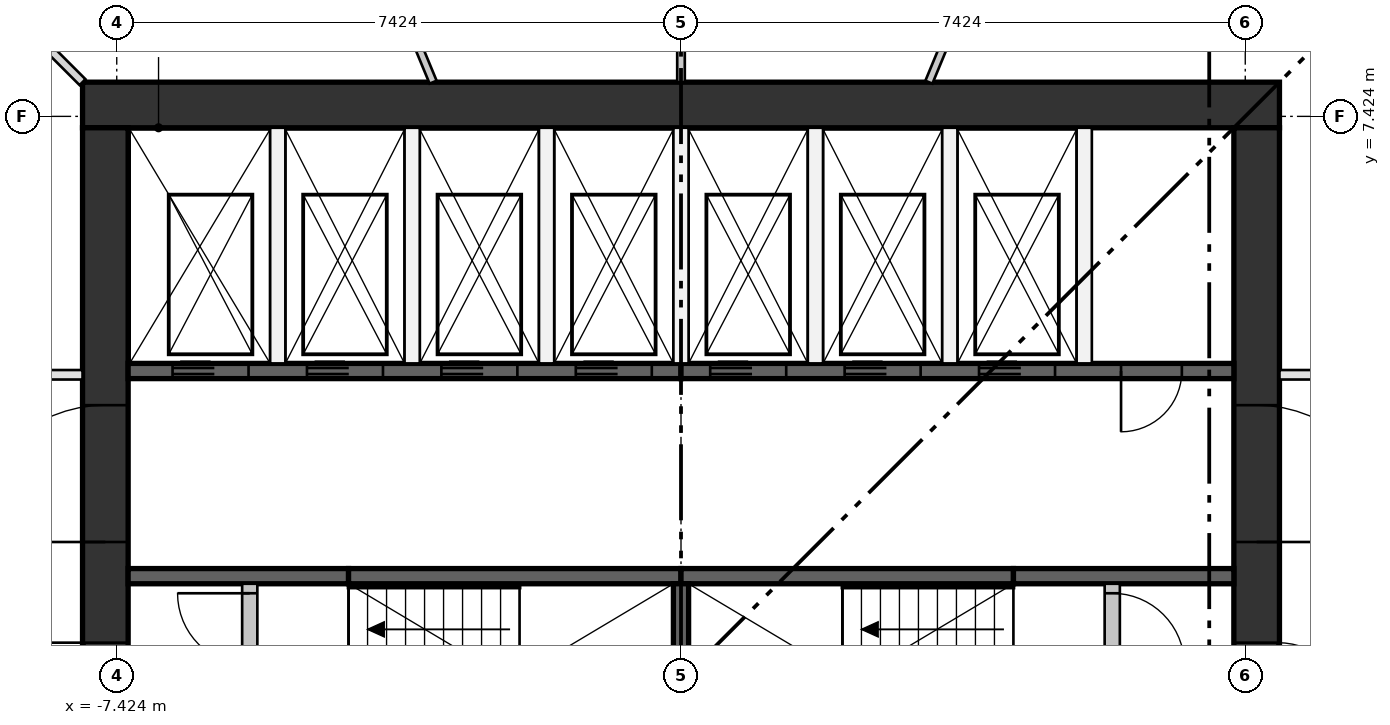
"""IFC4 building model, lengths in metres.
Left out: names, types, materials, properties, quantities, classifications, styles, units other than length and angle.
Written with IfcOpenShell. Run it as: python <this file> out.ifc"""

import sys

from ifc_helpers import new_model, si_unit, direction, frame, frame_2d, origin, place, context, subcontext, project, spatial, rectangle, extrude, element, fill, save


model = new_model("IFC4")
c1 = context("Model", 3, precision=1e-05, world=origin(), true_north=direction((0.0, 1.0)))
c2 = subcontext(c1, "Body", "Model", "MODEL_VIEW")
j1 = project(units=[si_unit("LENGTHUNIT", "METRE"), si_unit("PLANEANGLEUNIT", "RADIAN")], contexts=[c1])
p1 = place(None, origin())
s1 = spatial("IfcSite", under=j1, at=p1, CompositionType="ELEMENT")
p2 = place(p1, origin())
s2 = spatial("IfcBuilding", under=s1, at=p2, CompositionType="ELEMENT")
p3 = place(p2, frame((0.0, 0.0, 124.3)))
s3 = spatial("IfcBuildingStorey", under=s2, at=p3, CompositionType="ELEMENT", Elevation=124.3)
p4 = place(p3, frame((-7.874, 7.574, 0.0), z_axis=(0.0, 0.0, 1.0), x_axis=(1.0, 0.0, 0.0)))
e1 = element("IfcWall", 1, at=p4, inside=s3, PredefinedType="SHEAR", context=c2, shape_type="SweptSolid", body=[
    extrude(rectangle(XDim=15.748, YDim=0.6, at=frame_2d((7.874, 0.0))), origin(), (0.0, 0.0, 1.0), 3.35),
])
p5 = place(p3, frame((-7.574, -7.274, 0.0), z_axis=(0.0, 0.0, 1.0), x_axis=(0.0, 1.0, 0.0)))
e2 = element("IfcWall", 2, at=p5, inside=s3, PredefinedType="SHEAR", context=c2, shape_type="SweptSolid", body=[
    extrude(rectangle(XDim=14.548, YDim=0.6, at=frame_2d((7.274, 0.0))), origin(), (0.0, 0.0, 1.0), 3.35),
])
p6 = place(p5, frame((6.774, 0.0, 0.0)))
e3 = element("IfcOpeningElement", 3, at=p6, cuts=e2, PredefinedType="OPENING", context=c2, shape_type="SweptSolid", body=[
    extrude(rectangle(XDim=1.0, YDim=2.1, at=frame_2d((0.5, 1.05))), frame((0.0, 0.31, 0.0), z_axis=(0.0, -1.0, 0.0), x_axis=(1.0, 0.0, 0.0)), (0.0, 0.0, 1.0), 0.62),
])
p7 = place(p5, frame((3.649, 0.0, 0.0)))
e4 = element("IfcOpeningElement", 4, at=p7, cuts=e2, PredefinedType="OPENING", context=c2, shape_type="SweptSolid", body=[
    extrude(rectangle(XDim=1.8, YDim=2.1, at=frame_2d((0.9, 1.05))), frame((0.0, 0.31, 0.0), z_axis=(0.0, -1.0, 0.0), x_axis=(1.0, 0.0, 0.0)), (0.0, 0.0, 1.0), 0.62),
])
p8 = place(p5, frame((9.098, 0.0, 0.0)))
e5 = element("IfcOpeningElement", 5, at=p8, cuts=e2, PredefinedType="OPENING", context=c2, shape_type="SweptSolid", body=[
    extrude(rectangle(XDim=1.8, YDim=2.1, at=frame_2d((0.9, 1.05))), frame((0.0, 0.31, 0.0), z_axis=(0.0, -1.0, 0.0), x_axis=(1.0, 0.0, 0.0)), (0.0, 0.0, 1.0), 0.62),
])
p9 = place(p3, frame((7.574, -7.274, 0.0), z_axis=(0.0, 0.0, 1.0), x_axis=(0.0, 1.0, 0.0)))
e6 = element("IfcWall", 6, at=p9, inside=s3, PredefinedType="SHEAR", context=c2, shape_type="SweptSolid", body=[
    extrude(rectangle(XDim=14.548, YDim=0.6, at=frame_2d((7.274, 0.0))), origin(), (0.0, 0.0, 1.0), 3.35),
])
p10 = place(p9, frame((6.774, 0.0, 0.0)))
e7 = element("IfcOpeningElement", 7, at=p10, cuts=e6, PredefinedType="OPENING", context=c2, shape_type="SweptSolid", body=[
    extrude(rectangle(XDim=1.0, YDim=2.1, at=frame_2d((0.5, 1.05))), frame((0.0, 0.31, 0.0), z_axis=(0.0, -1.0, 0.0), x_axis=(1.0, 0.0, 0.0)), (0.0, 0.0, 1.0), 0.62),
])
p11 = place(p9, frame((3.649, 0.0, 0.0)))
e8 = element("IfcOpeningElement", 8, at=p11, cuts=e6, PredefinedType="OPENING", context=c2, shape_type="SweptSolid", body=[
    extrude(rectangle(XDim=1.8, YDim=2.1, at=frame_2d((0.9, 1.05))), frame((0.0, 0.31, 0.0), z_axis=(0.0, -1.0, 0.0), x_axis=(1.0, 0.0, 0.0)), (0.0, 0.0, 1.0), 0.62),
])
p12 = place(p9, frame((9.098, 0.0, 0.0)))
e9 = element("IfcOpeningElement", 9, at=p12, cuts=e6, PredefinedType="OPENING", context=c2, shape_type="SweptSolid", body=[
    extrude(rectangle(XDim=1.8, YDim=2.1, at=frame_2d((0.9, 1.05))), frame((0.0, 0.31, 0.0), z_axis=(0.0, -1.0, 0.0), x_axis=(1.0, 0.0, 0.0)), (0.0, 0.0, 1.0), 0.62),
])
p13 = place(p3, frame((-7.274, 4.074, 0.0), z_axis=(0.0, 0.0, 1.0), x_axis=(1.0, 0.0, 0.0)))
e10 = element("IfcWall", 10, at=p13, inside=s3, PredefinedType="SHEAR", context=c2, shape_type="SweptSolid", body=[
    extrude(rectangle(XDim=7.274, YDim=0.2, at=frame_2d((3.637, 0.0))), origin(), (0.0, 0.0, 1.0), 3.0),
])
p14 = place(p13, frame((0.584, 0.0, 0.0)))
e11 = element("IfcOpeningElement", 11, at=p14, cuts=e10, PredefinedType="OPENING", context=c2, shape_type="SweptSolid", body=[
    extrude(rectangle(XDim=1.0, YDim=2.1, at=frame_2d((0.5, 1.05))), frame((0.0, 0.11, 0.0), z_axis=(0.0, -1.0, 0.0), x_axis=(1.0, 0.0, 0.0)), (0.0, 0.0, 1.0), 0.22),
])
p15 = place(p13, frame((2.353, 0.0, 0.0)))
e12 = element("IfcOpeningElement", 12, at=p15, cuts=e10, PredefinedType="OPENING", context=c2, shape_type="SweptSolid", body=[
    extrude(rectangle(XDim=1.0, YDim=2.1, at=frame_2d((0.5, 1.05))), frame((0.0, 0.11, 0.0), z_axis=(0.0, -1.0, 0.0), x_axis=(1.0, 0.0, 0.0)), (0.0, 0.0, 1.0), 0.22),
])
p16 = place(p13, frame((4.121, 0.0, 0.0)))
e13 = element("IfcOpeningElement", 13, at=p16, cuts=e10, PredefinedType="OPENING", context=c2, shape_type="SweptSolid", body=[
    extrude(rectangle(XDim=1.0, YDim=2.1, at=frame_2d((0.5, 1.05))), frame((0.0, 0.11, 0.0), z_axis=(0.0, -1.0, 0.0), x_axis=(1.0, 0.0, 0.0)), (0.0, 0.0, 1.0), 0.22),
])
p17 = place(p13, frame((5.89, 0.0, 0.0)))
e14 = element("IfcOpeningElement", 14, at=p17, cuts=e10, PredefinedType="OPENING", context=c2, shape_type="SweptSolid", body=[
    extrude(rectangle(XDim=1.0, YDim=2.1, at=frame_2d((0.5, 1.05))), frame((0.0, 0.11, 0.0), z_axis=(0.0, -1.0, 0.0), x_axis=(1.0, 0.0, 0.0)), (0.0, 0.0, 1.0), 0.22),
])
p18 = place(p3, frame((0.0, 4.074, 0.0), z_axis=(0.0, 0.0, 1.0), x_axis=(1.0, 0.0, 0.0)))
e15 = element("IfcWall", 15, at=p18, inside=s3, PredefinedType="SHEAR", context=c2, shape_type="SweptSolid", body=[
    extrude(rectangle(XDim=7.274, YDim=0.2, at=frame_2d((3.637, 0.0))), origin(), (0.0, 0.0, 1.0), 3.0),
])
p19 = place(p18, frame((0.384, 0.0, 0.0)))
e16 = element("IfcOpeningElement", 16, at=p19, cuts=e15, PredefinedType="OPENING", context=c2, shape_type="SweptSolid", body=[
    extrude(rectangle(XDim=1.0, YDim=2.1, at=frame_2d((0.5, 1.05))), frame((0.0, 0.11, 0.0), z_axis=(0.0, -1.0, 0.0), x_axis=(1.0, 0.0, 0.0)), (0.0, 0.0, 1.0), 0.22),
])
p20 = place(p18, frame((2.153, 0.0, 0.0)))
e17 = element("IfcOpeningElement", 17, at=p20, cuts=e15, PredefinedType="OPENING", context=c2, shape_type="SweptSolid", body=[
    extrude(rectangle(XDim=1.0, YDim=2.1, at=frame_2d((0.5, 1.05))), frame((0.0, 0.11, 0.0), z_axis=(0.0, -1.0, 0.0), x_axis=(1.0, 0.0, 0.0)), (0.0, 0.0, 1.0), 0.22),
])
p21 = place(p18, frame((3.921, 0.0, 0.0)))
e18 = element("IfcOpeningElement", 18, at=p21, cuts=e15, PredefinedType="OPENING", context=c2, shape_type="SweptSolid", body=[
    extrude(rectangle(XDim=1.0, YDim=2.1, at=frame_2d((0.5, 1.05))), frame((0.0, 0.11, 0.0), z_axis=(0.0, -1.0, 0.0), x_axis=(1.0, 0.0, 0.0)), (0.0, 0.0, 1.0), 0.22),
])
p22 = place(p18, frame((5.79, 0.0, 0.0)))
e19 = element("IfcOpeningElement", 19, at=p22, cuts=e15, PredefinedType="OPENING", context=c2, shape_type="SweptSolid", body=[
    extrude(rectangle(XDim=0.8, YDim=2.1, at=frame_2d((0.4, 1.05))), frame((0.0, 0.11, 0.0), z_axis=(0.0, -1.0, 0.0), x_axis=(1.0, 0.0, 0.0)), (0.0, 0.0, 1.0), 0.22),
])
p23 = place(p3, frame((-7.274, 1.375, 0.0), z_axis=(0.0, 0.0, 1.0), x_axis=(1.0, 0.0, 0.0)))
e20 = element("IfcWall", 20, at=p23, inside=s3, PredefinedType="SHEAR", context=c2, shape_type="SweptSolid", body=[
    extrude(rectangle(XDim=2.9, YDim=0.2, at=frame_2d((1.45, 0.0))), origin(), (0.0, 0.0, 1.0), 3.0),
])
for number, where, z_axis, x_axis in (
    (21, (-4.374, 1.375, 0.0), (0.0, 0.0, 1.0), (1.0, 0.0, 0.0)),
    (22, (0.0, 1.375, 0.0), (0.0, 0.0, 1.0), (1.0, 0.0, 0.0)),
):
    element("IfcWall", number, at=place(p3, frame(where, z_axis=z_axis, x_axis=x_axis)), inside=s3, PredefinedType="SHEAR", context=c2, shape_type="SweptSolid", body=[
        extrude(rectangle(XDim=4.374, YDim=0.2, at=frame_2d((2.187, 0.0))), origin(), (0.0, 0.0, 1.0), 3.0),
    ])
p24 = place(p3, frame((4.374, 1.375, 0.0), z_axis=(0.0, 0.0, 1.0), x_axis=(1.0, 0.0, 0.0)))
e23 = element("IfcWall", 23, at=p24, inside=s3, PredefinedType="SHEAR", context=c2, shape_type="SweptSolid", body=[
    extrude(rectangle(XDim=2.9, YDim=0.2, at=frame_2d((1.45, 0.0))), origin(), (0.0, 0.0, 1.0), 3.0),
])
p25 = place(p3, frame((0.0, -1.275, 0.0), z_axis=(0.0, 0.0, 1.0), x_axis=(0.0, 1.0, 0.0)))
e24 = element("IfcWall", 24, at=p25, inside=s3, PredefinedType="SHEAR", context=c2, shape_type="SweptSolid", body=[
    extrude(rectangle(XDim=2.55, YDim=0.2, at=frame_2d((1.275, 0.0))), origin(), (0.0, 0.0, 1.0), 3.0),
])
for number, where, z_axis, x_axis in (
    (25, (-5.305, 4.174, 0.0), (0.0, 0.0, 1.0), (0.0, 1.0, 0.0)),
    (26, (-3.537, 4.174, 0.0), (0.0, 0.0, 1.0), (0.0, 1.0, 0.0)),
    (27, (-1.769, 4.174, 0.0), (0.0, 0.0, 1.0), (0.0, 1.0, 0.0)),
    (28, (0.0, 4.174, 0.0), (0.0, 0.0, 1.0), (0.0, 1.0, 0.0)),
    (29, (1.769, 4.174, 0.0), (0.0, 0.0, 1.0), (0.0, 1.0, 0.0)),
    (30, (3.537, 4.174, 0.0), (0.0, 0.0, 1.0), (0.0, 1.0, 0.0)),
    (31, (5.305, 4.174, 0.0), (0.0, 0.0, 1.0), (0.0, 1.0, 0.0)),
):
    element("IfcWall", number, at=place(p3, frame(where, z_axis=z_axis, x_axis=x_axis)), inside=s3, PredefinedType="PARTITIONING", context=c2, shape_type="SweptSolid", body=[
        extrude(rectangle(XDim=3.1, YDim=0.2, at=frame_2d((1.55, 0.0))), origin(), (0.0, 0.0, 1.0), 3.0),
    ])
p26 = place(p3, frame((-5.674, -1.275, 0.0), z_axis=(0.0, 0.0, 1.0), x_axis=(0.0, 1.0, 0.0)))
e32 = element("IfcWall", 32, at=p26, inside=s3, PredefinedType="PARTITIONING", context=c2, shape_type="SweptSolid", body=[
    extrude(rectangle(XDim=2.55, YDim=0.2, at=frame_2d((1.275, 0.0))), origin(), (0.0, 0.0, 1.0), 3.0),
])
p27 = place(p26, frame((0.125, 0.0, 0.0)))
e33 = element("IfcOpeningElement", 33, at=p27, cuts=e32, PredefinedType="OPENING", context=c2, shape_type="SweptSolid", body=[
    extrude(rectangle(XDim=0.95, YDim=2.1, at=frame_2d((0.475, 1.05))), frame((0.0, 0.11, 0.0), z_axis=(0.0, -1.0, 0.0), x_axis=(1.0, 0.0, 0.0)), (0.0, 0.0, 1.0), 0.22),
])
p28 = place(p26, frame((1.475, 0.0, 0.0)))
e34 = element("IfcOpeningElement", 34, at=p28, cuts=e32, PredefinedType="OPENING", context=c2, shape_type="SweptSolid", body=[
    extrude(rectangle(XDim=0.95, YDim=2.1, at=frame_2d((0.475, 1.05))), frame((0.0, 0.11, 0.0), z_axis=(0.0, -1.0, 0.0), x_axis=(1.0, 0.0, 0.0)), (0.0, 0.0, 1.0), 0.22),
])
p29 = place(p3, frame((5.674, -1.275, 0.0), z_axis=(0.0, 0.0, 1.0), x_axis=(0.0, 1.0, 0.0)))
e35 = element("IfcWall", 35, at=p29, inside=s3, PredefinedType="PARTITIONING", context=c2, shape_type="SweptSolid", body=[
    extrude(rectangle(XDim=2.55, YDim=0.2, at=frame_2d((1.275, 0.0))), origin(), (0.0, 0.0, 1.0), 3.0),
])
p30 = place(p29, frame((0.125, 0.0, 0.0)))
e36 = element("IfcOpeningElement", 36, at=p30, cuts=e35, PredefinedType="OPENING", context=c2, shape_type="SweptSolid", body=[
    extrude(rectangle(XDim=0.95, YDim=2.1, at=frame_2d((0.475, 1.05))), frame((0.0, 0.11, 0.0), z_axis=(0.0, -1.0, 0.0), x_axis=(1.0, 0.0, 0.0)), (0.0, 0.0, 1.0), 0.22),
])
p31 = place(p29, frame((1.475, 0.0, 0.0)))
e37 = element("IfcOpeningElement", 37, at=p31, cuts=e35, PredefinedType="OPENING", context=c2, shape_type="SweptSolid", body=[
    extrude(rectangle(XDim=0.95, YDim=2.1, at=frame_2d((0.475, 1.05))), frame((0.0, 0.11, 0.0), z_axis=(0.0, -1.0, 0.0), x_axis=(1.0, 0.0, 0.0)), (0.0, 0.0, 1.0), 0.22),
])
p32 = place(p3, frame((7.874, 4.024, 0.0), z_axis=(0.0, 0.0, 1.0), x_axis=(1.0, 0.0, 0.0)))
e38 = element("IfcWall", 38, at=p32, inside=s3, PredefinedType="PARTITIONING", context=c2, shape_type="SweptSolid", body=[
    extrude(rectangle(XDim=5.384, YDim=0.125, at=frame_2d((2.692, 0.0))), origin(), (0.0, 0.0, 1.0), 3.0),
])
p33 = place(p32, frame((1.8, 0.0, 0.0)))
e39 = element("IfcOpeningElement", 39, at=p33, cuts=e38, PredefinedType="OPENING", context=c2, shape_type="SweptSolid", body=[
    extrude(rectangle(XDim=1.8, YDim=2.1, at=frame_2d((0.9, 1.05))), frame((0.0, 0.073, 0.0), z_axis=(0.0, -1.0, 0.0), x_axis=(1.0, 0.0, 0.0)), (0.0, 0.0, 1.0), 0.145),
])
p34 = place(p3, frame((-13.784, 4.024, 0.0), z_axis=(0.0, 0.0, 1.0), x_axis=(1.0, 0.0, 0.0)))
e40 = element("IfcWall", 40, at=p34, inside=s3, PredefinedType="PARTITIONING", context=c2, shape_type="SweptSolid", body=[
    extrude(rectangle(XDim=5.91, YDim=0.125, at=frame_2d((2.955, 0.0))), origin(), (0.0, 0.0, 1.0), 3.0),
])
p35 = place(p34, frame((2.5, 0.0, 0.0)))
e41 = element("IfcOpeningElement", 41, at=p35, cuts=e40, PredefinedType="OPENING", context=c2, shape_type="SweptSolid", body=[
    extrude(rectangle(XDim=1.0, YDim=2.1, at=frame_2d((0.5, 1.05))), frame((0.0, 0.073, 0.0), z_axis=(0.0, -1.0, 0.0), x_axis=(1.0, 0.0, 0.0)), (0.0, 0.0, 1.0), 0.145),
])
p36 = place(p3, frame((3.261, 7.874, 0.0), z_axis=(0.0, 0.0, 1.0), x_axis=(0.382689326263, 0.923877091157, 0.0)))
e42 = element("IfcWall", 42, at=p36, inside=s3, PredefinedType="PARTITIONING", context=c2, shape_type="SweptSolid", body=[
    extrude(rectangle(XDim=6.537, YDim=0.1, at=frame_2d((3.269, 0.0))), origin(), (0.0, 0.0, 1.0), 3.0),
])
p37 = place(p36, frame((2.8, 0.0, 0.0)))
e43 = element("IfcOpeningElement", 43, at=p37, cuts=e42, PredefinedType="OPENING", context=c2, shape_type="SweptSolid", body=[
    extrude(rectangle(XDim=1.0, YDim=2.1, at=frame_2d((0.5, 1.05))), frame((0.0, 0.06, 0.0), z_axis=(0.0, -1.0, 0.0), x_axis=(1.0, 0.0, 0.0)), (0.0, 0.0, 1.0), 0.12),
])
p38 = place(p3, frame((0.0, 7.874, 0.0), z_axis=(0.0, 0.0, 1.0), x_axis=(0.0, 1.0, 0.0)))
e44 = element("IfcWall", 44, at=p38, inside=s3, PredefinedType="PARTITIONING", context=c2, shape_type="SweptSolid", body=[
    extrude(rectangle(XDim=7.186, YDim=0.1, at=frame_2d((3.593, 0.0))), origin(), (0.0, 0.0, 1.0), 3.0),
])
p39 = place(p38, frame((3.1, 0.0, 0.0)))
e45 = element("IfcOpeningElement", 45, at=p39, cuts=e44, PredefinedType="OPENING", context=c2, shape_type="SweptSolid", body=[
    extrude(rectangle(XDim=1.0, YDim=2.1, at=frame_2d((0.5, 1.05))), frame((0.0, 0.06, 0.0), z_axis=(0.0, -1.0, 0.0), x_axis=(1.0, 0.0, 0.0)), (0.0, 0.0, 1.0), 0.12),
])
p40 = place(p3, frame((-3.261, 7.874, 0.0), z_axis=(0.0, 0.0, 1.0), x_axis=(-0.382689326263, 0.923877091157, 0.0)))
e46 = element("IfcWall", 46, at=p40, inside=s3, PredefinedType="PARTITIONING", context=c2, shape_type="SweptSolid", body=[
    extrude(rectangle(XDim=6.537, YDim=0.1, at=frame_2d((3.269, 0.0))), origin(), (0.0, 0.0, 1.0), 3.0),
])
p41 = place(p40, frame((2.8, 0.0, 0.0)))
e47 = element("IfcOpeningElement", 47, at=p41, cuts=e46, PredefinedType="OPENING", context=c2, shape_type="SweptSolid", body=[
    extrude(rectangle(XDim=1.0, YDim=2.1, at=frame_2d((0.5, 1.05))), frame((0.0, 0.06, 0.0), z_axis=(0.0, -1.0, 0.0), x_axis=(1.0, 0.0, 0.0)), (0.0, 0.0, 1.0), 0.12),
])
p42 = place(p3, frame((-7.874, 7.874, 0.0), z_axis=(0.0, 0.0, 1.0), x_axis=(-0.707106781187, 0.707106781187, 0.0)))
e48 = element("IfcWall", 48, at=p42, inside=s3, PredefinedType="PARTITIONING", context=c2, shape_type="SweptSolid", body=[
    extrude(rectangle(XDim=6.794, YDim=0.11, at=frame_2d((3.397, 0.0))), origin(), (0.0, 0.0, 1.0), 3.0),
])
p43 = place(p14, frame((1.0, 0.0, 0.0), z_axis=(0.0, 0.0, 1.0), x_axis=(-1.0, 0.0, 0.0)))
e49 = element("IfcDoor", 49, at=p43, inside=s3, OperationType="DOUBLE_DOOR_SLIDING", PredefinedType="DOOR", context=c2, shape_type="SweptSolid", body=[
    extrude(rectangle(XDim=1.0, YDim=2.1, at=frame_2d((0.5, 1.05))), frame((0.0, 0.025, 0.0), z_axis=(0.0, -1.0, 0.0), x_axis=(1.0, 0.0, 0.0)), (0.0, 0.0, 1.0), 0.05),
])
fill(e11, e49)
p44 = place(p15, frame((1.0, 0.0, 0.0), z_axis=(0.0, 0.0, 1.0), x_axis=(-1.0, 0.0, 0.0)))
e50 = element("IfcDoor", 50, at=p44, inside=s3, OperationType="DOUBLE_DOOR_SLIDING", PredefinedType="DOOR", context=c2, shape_type="SweptSolid", body=[
    extrude(rectangle(XDim=1.0, YDim=2.1, at=frame_2d((0.5, 1.05))), frame((0.0, 0.025, 0.0), z_axis=(0.0, -1.0, 0.0), x_axis=(1.0, 0.0, 0.0)), (0.0, 0.0, 1.0), 0.05),
])
fill(e12, e50)
p45 = place(p16, frame((1.0, 0.0, 0.0), z_axis=(0.0, 0.0, 1.0), x_axis=(-1.0, 0.0, 0.0)))
e51 = element("IfcDoor", 51, at=p45, inside=s3, OperationType="DOUBLE_DOOR_SLIDING", PredefinedType="DOOR", context=c2, shape_type="SweptSolid", body=[
    extrude(rectangle(XDim=1.0, YDim=2.1, at=frame_2d((0.5, 1.05))), frame((0.0, 0.025, 0.0), z_axis=(0.0, -1.0, 0.0), x_axis=(1.0, 0.0, 0.0)), (0.0, 0.0, 1.0), 0.05),
])
fill(e13, e51)
p46 = place(p17, frame((1.0, 0.0, 0.0), z_axis=(0.0, 0.0, 1.0), x_axis=(-1.0, 0.0, 0.0)))
e52 = element("IfcDoor", 52, at=p46, inside=s3, OperationType="DOUBLE_DOOR_SLIDING", PredefinedType="DOOR", context=c2, shape_type="SweptSolid", body=[
    extrude(rectangle(XDim=1.0, YDim=2.1, at=frame_2d((0.5, 1.05))), frame((0.0, 0.025, 0.0), z_axis=(0.0, -1.0, 0.0), x_axis=(1.0, 0.0, 0.0)), (0.0, 0.0, 1.0), 0.05),
])
fill(e14, e52)
p47 = place(p19, frame((1.0, 0.0, 0.0), z_axis=(0.0, 0.0, 1.0), x_axis=(-1.0, 0.0, 0.0)))
e53 = element("IfcDoor", 53, at=p47, inside=s3, OperationType="DOUBLE_DOOR_SLIDING", PredefinedType="DOOR", context=c2, shape_type="SweptSolid", body=[
    extrude(rectangle(XDim=1.0, YDim=2.1, at=frame_2d((0.5, 1.05))), frame((0.0, 0.025, 0.0), z_axis=(0.0, -1.0, 0.0), x_axis=(1.0, 0.0, 0.0)), (0.0, 0.0, 1.0), 0.05),
])
fill(e16, e53)
p48 = place(p20, frame((1.0, 0.0, 0.0), z_axis=(0.0, 0.0, 1.0), x_axis=(-1.0, 0.0, 0.0)))
e54 = element("IfcDoor", 54, at=p48, inside=s3, OperationType="DOUBLE_DOOR_SLIDING", PredefinedType="DOOR", context=c2, shape_type="SweptSolid", body=[
    extrude(rectangle(XDim=1.0, YDim=2.1, at=frame_2d((0.5, 1.05))), frame((0.0, 0.025, 0.0), z_axis=(0.0, -1.0, 0.0), x_axis=(1.0, 0.0, 0.0)), (0.0, 0.0, 1.0), 0.05),
])
fill(e17, e54)
p49 = place(p21, frame((1.0, 0.0, 0.0), z_axis=(0.0, 0.0, 1.0), x_axis=(-1.0, 0.0, 0.0)))
e55 = element("IfcDoor", 55, at=p49, inside=s3, OperationType="DOUBLE_DOOR_SLIDING", PredefinedType="DOOR", context=c2, shape_type="SweptSolid", body=[
    extrude(rectangle(XDim=1.0, YDim=2.1, at=frame_2d((0.5, 1.05))), frame((0.0, 0.025, 0.0), z_axis=(0.0, -1.0, 0.0), x_axis=(1.0, 0.0, 0.0)), (0.0, 0.0, 1.0), 0.05),
])
fill(e18, e55)
p50 = place(p28, origin())
e56 = element("IfcDoor", 56, at=p50, inside=s3, OperationType="SINGLE_SWING_RIGHT", PredefinedType="DOOR", context=c2, shape_type="SweptSolid", body=[
    extrude(rectangle(XDim=0.95, YDim=2.1, at=frame_2d((0.475, 1.05))), frame((0.0, 0.025, 0.0), z_axis=(0.0, -1.0, 0.0), x_axis=(1.0, 0.0, 0.0)), (0.0, 0.0, 1.0), 0.05),
])
fill(e34, e56)
p51 = place(p31, frame((0.95, 0.0, 0.0), z_axis=(0.0, 0.0, 1.0), x_axis=(-1.0, 0.0, 0.0)))
e57 = element("IfcDoor", 57, at=p51, inside=s3, OperationType="SINGLE_SWING_LEFT", PredefinedType="DOOR", context=c2, shape_type="SweptSolid", body=[
    extrude(rectangle(XDim=0.95, YDim=2.1, at=frame_2d((0.475, 1.05))), frame((0.0, 0.025, 0.0), z_axis=(0.0, -1.0, 0.0), x_axis=(1.0, 0.0, 0.0)), (0.0, 0.0, 1.0), 0.05),
])
fill(e37, e57)
p52 = place(p22, frame((0.8, 0.0, 0.0), z_axis=(0.0, 0.0, 1.0), x_axis=(-1.0, 0.0, 0.0)))
e58 = element("IfcDoor", 58, at=p52, inside=s3, OperationType="SINGLE_SWING_LEFT", PredefinedType="DOOR", context=c2, shape_type="SweptSolid", body=[
    extrude(rectangle(XDim=0.8, YDim=2.1, at=frame_2d((0.4, 1.05))), frame((0.0, 0.025, 0.0), z_axis=(0.0, -1.0, 0.0), x_axis=(1.0, 0.0, 0.0)), (0.0, 0.0, 1.0), 0.05),
])
fill(e19, e58)
p53 = place(p6, origin())
e59 = element("IfcDoor", 59, at=p53, inside=s3, OperationType="SINGLE_SWING_RIGHT", PredefinedType="DOOR", context=c2, shape_type="SweptSolid", body=[
    extrude(rectangle(XDim=1.0, YDim=2.1, at=frame_2d((0.5, 1.05))), frame((0.0, 0.3, 0.0), z_axis=(0.0, -1.0, 0.0), x_axis=(1.0, 0.0, 0.0)), (0.0, 0.0, 1.0), 0.05),
])
fill(e3, e59)
p54 = place(p8, origin())
e60 = element("IfcDoor", 60, at=p54, inside=s3, OperationType="DOUBLE_DOOR_SINGLE_SWING", PredefinedType="DOOR", context=c2, shape_type="SweptSolid", body=[
    extrude(rectangle(XDim=1.8, YDim=2.1, at=frame_2d((0.9, 1.05))), frame((0.0, 0.025, 0.0), z_axis=(0.0, -1.0, 0.0), x_axis=(1.0, 0.0, 0.0)), (0.0, 0.0, 1.0), 0.05),
])
fill(e5, e60)
p55 = place(p10, frame((1.0, 0.0, 0.0), z_axis=(0.0, 0.0, 1.0), x_axis=(-1.0, 0.0, 0.0)))
e61 = element("IfcDoor", 61, at=p55, inside=s3, OperationType="SINGLE_SWING_LEFT", PredefinedType="DOOR", context=c2, shape_type="SweptSolid", body=[
    extrude(rectangle(XDim=1.0, YDim=2.1, at=frame_2d((0.5, 1.05))), frame((0.0, 0.3, 0.0), z_axis=(0.0, -1.0, 0.0), x_axis=(1.0, 0.0, 0.0)), (0.0, 0.0, 1.0), 0.05),
])
fill(e7, e61)
p56 = place(p12, frame((1.8, 0.0, 0.0), z_axis=(0.0, 0.0, 1.0), x_axis=(-1.0, 0.0, 0.0)))
e62 = element("IfcDoor", 62, at=p56, inside=s3, OperationType="DOUBLE_DOOR_SINGLE_SWING", PredefinedType="DOOR", context=c2, shape_type="SweptSolid", body=[
    extrude(rectangle(XDim=1.8, YDim=2.1, at=frame_2d((0.9, 1.05))), frame((0.0, 0.025, 0.0), z_axis=(0.0, -1.0, 0.0), x_axis=(1.0, 0.0, 0.0)), (0.0, 0.0, 1.0), 0.05),
])
fill(e9, e62)
save(model, sys.argv[1])
